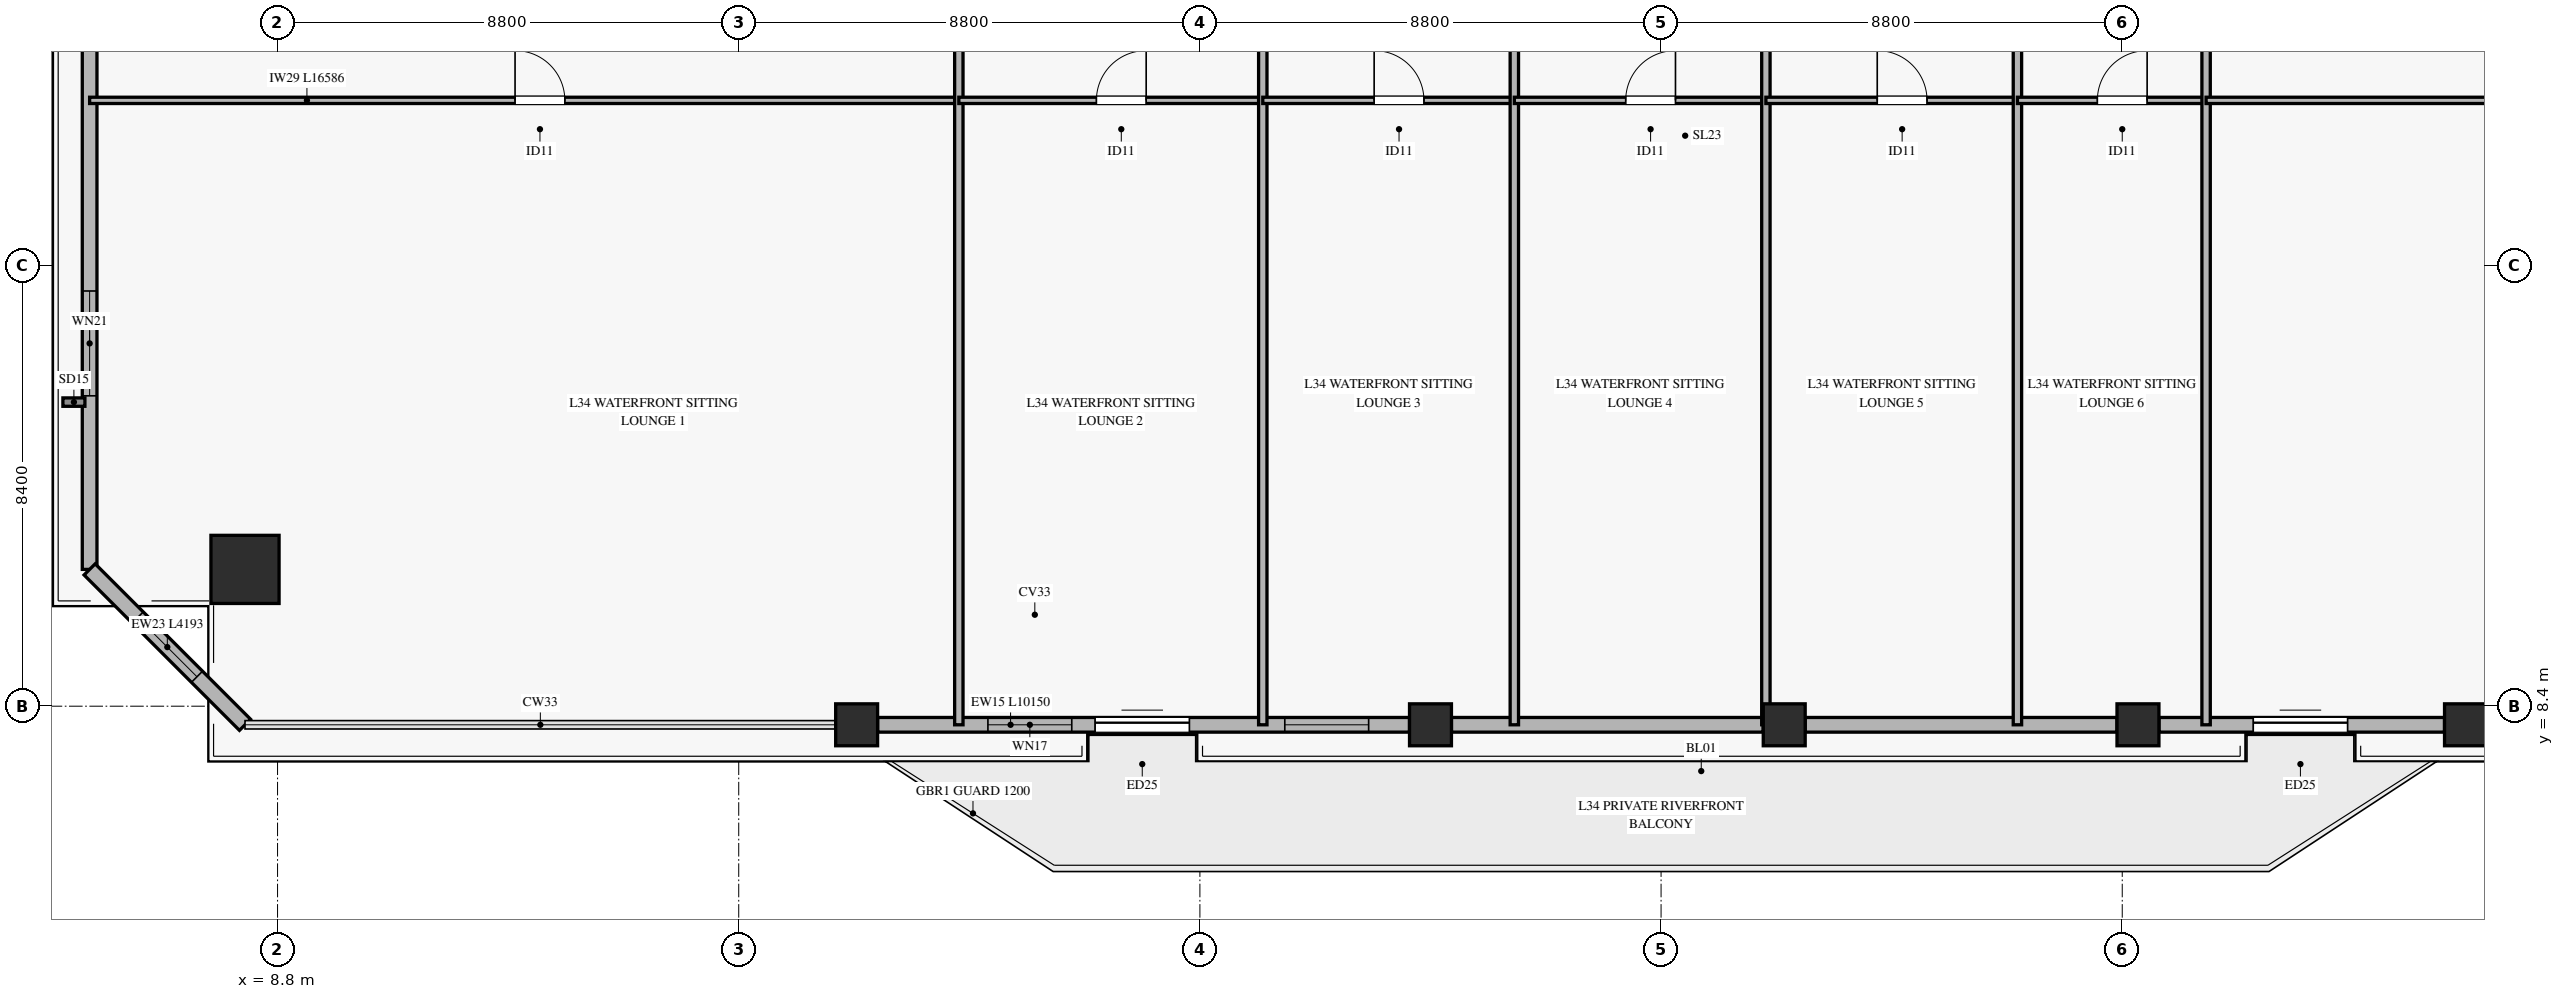
"""IFC4 building model, lengths in metres.
Left out: names, types, materials, properties, quantities, classifications, styles, units other than length and angle.
Written with IfcOpenShell. Run it as: python <this file> out.ifc"""

import sys

from ifc_helpers import new_model, si_unit, direction, frame, frame_2d, origin, origin_2d, place, context, subcontext, project, spatial, rectangle, hollow_rectangle, extrude, source, transform, mapped, element, fill, save


model = new_model("IFC4")
c1 = context("Model", 3, precision=1e-05, world=origin(), true_north=direction((0.0, 1.0)))
c2 = subcontext(c1, "Body", "Model", "MODEL_VIEW")
j1 = project(units=[si_unit("LENGTHUNIT", "METRE"), si_unit("PLANEANGLEUNIT", "RADIAN")], contexts=[c1])
p1 = place(None, origin())
s1 = spatial("IfcSite", under=j1, at=p1, CompositionType="ELEMENT")
p2 = place(p1, origin())
s2 = spatial("IfcBuilding", under=s1, at=p2, CompositionType="ELEMENT")
p3 = place(p2, frame((0.0, 0.0, 141.2)))
s3 = spatial("IfcBuildingStorey", under=s2, at=p3, CompositionType="ELEMENT", Elevation=141.2)
m1 = source(origin(), c2, "Body", "SweptSolid", [
    extrude(hollow_rectangle(XDim=1.3, YDim=1.3, WallThickness=0.06, at=origin_2d()), origin(), (0.0, 0.0, 1.0), 3.22),
])
p4 = place(p3, frame((8.179, 11.01, 0.0), z_axis=(0.0, 0.0, 1.0), x_axis=(1.0, 0.0, 0.0)))
e1 = element("IfcColumn", 1, at=p4, inside=s3, PredefinedType="COLUMN", context=c2, shape_type="MappedRepresentation", body=[
    mapped(m1, transform((0.0, 0.0, 0.0), x_axis=(1.0, 0.0, 0.0), y_axis=(0.0, 1.0, 0.0), z_axis=(0.0, 0.0, 1.0), scale=1.0)),
])
m2 = source(origin(), c2, "Body", "SweptSolid", [
    extrude(hollow_rectangle(XDim=0.8, YDim=0.8, WallThickness=0.036, at=origin_2d()), origin(), (0.0, 0.0, 1.0), 3.22),
])
for number, where, z_axis, x_axis in (
    (2, (19.85, 8.045, 0.0), (0.0, 0.0, 1.0), (1.0, 0.0, 0.0)),
    (3, (30.8, 8.045, 0.0), (0.0, 0.0, 1.0), (1.0, 0.0, 0.0)),
    (4, (37.55, 8.045, 0.0), (0.0, 0.0, 1.0), (1.0, 0.0, 0.0)),
    (5, (44.3, 8.045, 0.0), (0.0, 0.0, 1.0), (1.0, 0.0, 0.0)),
    (6, (50.55, 8.045, 0.0), (0.0, 0.0, 1.0), (1.0, 0.0, 0.0)),
):
    element("IfcColumn", number, at=place(p3, frame(where, z_axis=z_axis, x_axis=x_axis)), inside=s3, PredefinedType="COLUMN", context=c2, shape_type="MappedRepresentation", body=[
        mapped(m2, transform((0.0, 0.0, 0.0), x_axis=(1.0, 0.0, 0.0), y_axis=(0.0, 1.0, 0.0), z_axis=(0.0, 0.0, 1.0), scale=1.0)),
    ])
p5 = place(p3, frame((20.25, 8.045, 0.0), z_axis=(0.0, 0.0, 1.0), x_axis=(1.0, 0.0, 0.0)))
e7 = element("IfcWall", 7, at=p5, inside=s3, PredefinedType="SOLIDWALL", context=c2, shape_type="SweptSolid", body=[
    extrude(rectangle(XDim=10.15, YDim=0.28, at=frame_2d((5.075, 0.0))), origin(), (0.0, 0.0, 1.0), 2.7),
])
p6 = place(p5, frame((4.15, 0.0, 0.0)))
e8 = element("IfcOpeningElement", 8, at=p6, cuts=e7, PredefinedType="OPENING", context=c2, shape_type="SweptSolid", body=[
    extrude(rectangle(XDim=1.8, YDim=2.25, at=frame_2d((0.9, 1.125))), frame((0.0, 0.15, 0.0), z_axis=(0.0, -1.0, 0.0), x_axis=(1.0, 0.0, 0.0)), (0.0, 0.0, 1.0), 0.3),
])
p7 = place(p5, frame((2.105, 0.0, 0.35)))
e9 = element("IfcOpeningElement", 9, at=p7, cuts=e7, PredefinedType="OPENING", context=c2, shape_type="SweptSolid", body=[
    extrude(rectangle(XDim=1.6, YDim=2.0, at=frame_2d((0.8, 1.0))), frame((0.0, 0.15, 0.0), z_axis=(0.0, -1.0, 0.0), x_axis=(1.0, 0.0, 0.0)), (0.0, 0.0, 1.0), 0.3),
])
p8 = place(p5, frame((7.77, 0.0, 0.35)))
e10 = element("IfcOpeningElement", 10, at=p8, cuts=e7, PredefinedType="OPENING", context=c2, shape_type="SweptSolid", body=[
    extrude(rectangle(XDim=1.6, YDim=2.0, at=frame_2d((0.8, 1.0))), frame((0.0, 0.15, 0.0), z_axis=(0.0, -1.0, 0.0), x_axis=(1.0, 0.0, 0.0)), (0.0, 0.0, 1.0), 0.3),
])
for number, where, z_axis, x_axis in (
    (11, (31.2, 8.045, 0.0), (0.0, 0.0, 1.0), (1.0, 0.0, 0.0)),
    (12, (37.95, 8.045, 0.0), (0.0, 0.0, 1.0), (1.0, 0.0, 0.0)),
):
    element("IfcWall", number, at=place(p3, frame(where, z_axis=z_axis, x_axis=x_axis)), inside=s3, PredefinedType="SOLIDWALL", context=c2, shape_type="SweptSolid", body=[
        extrude(rectangle(XDim=5.95, YDim=0.28, at=frame_2d((2.975, 0.0))), origin(), (0.0, 0.0, 1.0), 2.7),
    ])
p9 = place(p3, frame((44.7, 8.045, 0.0), z_axis=(0.0, 0.0, 1.0), x_axis=(1.0, 0.0, 0.0)))
e13 = element("IfcWall", 13, at=p9, inside=s3, PredefinedType="SOLIDWALL", context=c2, shape_type="SweptSolid", body=[
    extrude(rectangle(XDim=5.45, YDim=0.28, at=frame_2d((2.725, 0.0))), origin(), (0.0, 0.0, 1.0), 2.7),
])
p10 = place(p9, frame((1.8, 0.0, 0.0)))
e14 = element("IfcOpeningElement", 14, at=p10, cuts=e13, PredefinedType="OPENING", context=c2, shape_type="SweptSolid", body=[
    extrude(rectangle(XDim=1.8, YDim=2.25, at=frame_2d((0.9, 1.125))), frame((0.0, 0.15, 0.0), z_axis=(0.0, -1.0, 0.0), x_axis=(1.0, 0.0, 0.0)), (0.0, 0.0, 1.0), 0.3),
])
p11 = place(p3, frame((5.214, 11.01, 0.0), z_axis=(0.0, 0.0, 1.0), x_axis=(0.0, 1.0, 0.0)))
e15 = element("IfcWall", 15, at=p11, inside=s3, PredefinedType="SOLIDWALL", context=c2, shape_type="SweptSolid", body=[
    extrude(rectangle(XDim=15.662, YDim=0.28, at=frame_2d((7.831, 0.0))), origin(), (0.0, 0.0, 1.0), 2.7),
])
p12 = place(p11, frame((3.312, 0.0, 0.45)))
e16 = element("IfcOpeningElement", 16, at=p12, cuts=e15, PredefinedType="OPENING", context=c2, shape_type="SweptSolid", body=[
    extrude(rectangle(XDim=2.0, YDim=2.0, at=frame_2d((1.0, 1.0))), frame((0.0, 0.15, 0.0), z_axis=(0.0, -1.0, 0.0), x_axis=(1.0, 0.0, 0.0)), (0.0, 0.0, 1.0), 0.3),
])
p13 = place(p11, frame((10.643, 0.0, 0.45)))
e17 = element("IfcOpeningElement", 17, at=p13, cuts=e15, PredefinedType="OPENING", context=c2, shape_type="SweptSolid", body=[
    extrude(rectangle(XDim=2.0, YDim=2.0, at=frame_2d((1.0, 1.0))), frame((0.0, 0.15, 0.0), z_axis=(0.0, -1.0, 0.0), x_axis=(1.0, 0.0, 0.0)), (0.0, 0.0, 1.0), 0.3),
])
p14 = place(p3, frame((5.214, 11.01, 0.0), z_axis=(0.0, 0.0, 1.0), x_axis=(0.707077668364, -0.70713589281, 0.0)))
e18 = element("IfcWall", 18, at=p14, inside=s3, PredefinedType="SOLIDWALL", context=c2, shape_type="SweptSolid", body=[
    extrude(rectangle(XDim=4.193, YDim=0.3, at=frame_2d((2.097, 0.0))), origin(), (0.0, 0.0, 1.0), 2.7),
])
p15 = place(p14, frame((1.297, 0.0, 0.45)))
e19 = element("IfcOpeningElement", 19, at=p15, cuts=e18, PredefinedType="OPENING", context=c2, shape_type="SweptSolid", body=[
    extrude(rectangle(XDim=1.6, YDim=2.0, at=frame_2d((0.8, 1.0))), frame((0.0, 0.16, 0.0), z_axis=(0.0, -1.0, 0.0), x_axis=(1.0, 0.0, 0.0)), (0.0, 0.0, 1.0), 0.32),
])
p16 = place(p3, frame((5.214, 19.959, 0.0), z_axis=(0.0, 0.0, 1.0), x_axis=(1.0, 0.0, 0.0)))
e20 = element("IfcWall", 20, at=p16, inside=s3, PredefinedType="PARTITIONING", context=c2, shape_type="SweptSolid", body=[
    extrude(rectangle(XDim=16.586, YDim=0.12, at=frame_2d((8.293, 0.0))), origin(), (0.0, 0.0, 1.0), 2.405),
])
p17 = place(p16, frame((8.118, 0.0, 0.0)))
e21 = element("IfcOpeningElement", 21, at=p17, cuts=e20, PredefinedType="OPENING", context=c2, shape_type="SweptSolid", body=[
    extrude(rectangle(XDim=0.95, YDim=2.1, at=frame_2d((0.475, 1.05))), frame((0.0, 0.07, 0.0), z_axis=(0.0, -1.0, 0.0), x_axis=(1.0, 0.0, 0.0)), (0.0, 0.0, 1.0), 0.14),
])
p18 = place(p3, frame((21.8, 8.045, 0.0), z_axis=(0.0, 0.0, 1.0), x_axis=(0.0, 1.0, 0.0)))
e22 = element("IfcWall", 22, at=p18, inside=s3, PredefinedType="PARTITIONING", context=c2, shape_type="SweptSolid", body=[
    extrude(rectangle(XDim=27.155, YDim=0.16, at=frame_2d((13.578, 0.0))), origin(), (0.0, 0.0, 1.0), 2.705),
])
p19 = place(p3, frame((21.8, 19.959, 0.0), z_axis=(0.0, 0.0, 1.0), x_axis=(1.0, 0.0, 0.0)))
e23 = element("IfcWall", 23, at=p19, inside=s3, PredefinedType="PARTITIONING", context=c2, shape_type="SweptSolid", body=[
    extrude(rectangle(XDim=5.8, YDim=0.12, at=frame_2d((2.9, 0.0))), origin(), (0.0, 0.0, 1.0), 3.22),
])
p20 = place(p19, frame((2.625, 0.0, 0.0)))
e24 = element("IfcOpeningElement", 24, at=p20, cuts=e23, PredefinedType="OPENING", context=c2, shape_type="SweptSolid", body=[
    extrude(rectangle(XDim=0.95, YDim=2.1, at=frame_2d((0.475, 1.05))), frame((0.0, 0.07, 0.0), z_axis=(0.0, -1.0, 0.0), x_axis=(1.0, 0.0, 0.0)), (0.0, 0.0, 1.0), 0.14),
])
p21 = place(p3, frame((27.6, 8.045, 0.0), z_axis=(0.0, 0.0, 1.0), x_axis=(0.0, 1.0, 0.0)))
e25 = element("IfcWall", 25, at=p21, inside=s3, PredefinedType="PARTITIONING", context=c2, shape_type="SweptSolid", body=[
    extrude(rectangle(XDim=27.155, YDim=0.16, at=frame_2d((13.578, 0.0))), origin(), (0.0, 0.0, 1.0), 2.705),
])
p22 = place(p3, frame((27.6, 19.959, 0.0), z_axis=(0.0, 0.0, 1.0), x_axis=(1.0, 0.0, 0.0)))
e26 = element("IfcWall", 26, at=p22, inside=s3, PredefinedType="PARTITIONING", context=c2, shape_type="SweptSolid", body=[
    extrude(rectangle(XDim=4.8, YDim=0.12, at=frame_2d((2.4, 0.0))), origin(), (0.0, 0.0, 1.0), 2.405),
])
p23 = place(p22, frame((2.125, 0.0, 0.0)))
e27 = element("IfcOpeningElement", 27, at=p23, cuts=e26, PredefinedType="OPENING", context=c2, shape_type="SweptSolid", body=[
    extrude(rectangle(XDim=0.95, YDim=2.1, at=frame_2d((0.475, 1.05))), frame((0.0, 0.07, 0.0), z_axis=(0.0, -1.0, 0.0), x_axis=(1.0, 0.0, 0.0)), (0.0, 0.0, 1.0), 0.14),
])
p24 = place(p3, frame((32.4, 8.045, 0.0), z_axis=(0.0, 0.0, 1.0), x_axis=(0.0, 1.0, 0.0)))
e28 = element("IfcWall", 28, at=p24, inside=s3, PredefinedType="PARTITIONING", context=c2, shape_type="SweptSolid", body=[
    extrude(rectangle(XDim=27.155, YDim=0.16, at=frame_2d((13.578, 0.0))), origin(), (0.0, 0.0, 1.0), 2.705),
])
p25 = place(p3, frame((32.4, 19.959, 0.0), z_axis=(0.0, 0.0, 1.0), x_axis=(1.0, 0.0, 0.0)))
e29 = element("IfcWall", 29, at=p25, inside=s3, PredefinedType="PARTITIONING", context=c2, shape_type="SweptSolid", body=[
    extrude(rectangle(XDim=4.8, YDim=0.12, at=frame_2d((2.4, 0.0))), origin(), (0.0, 0.0, 1.0), 3.22),
])
p26 = place(p25, frame((2.125, 0.0, 0.0)))
e30 = element("IfcOpeningElement", 30, at=p26, cuts=e29, PredefinedType="OPENING", context=c2, shape_type="SweptSolid", body=[
    extrude(rectangle(XDim=0.95, YDim=2.1, at=frame_2d((0.475, 1.05))), frame((0.0, 0.07, 0.0), z_axis=(0.0, -1.0, 0.0), x_axis=(1.0, 0.0, 0.0)), (0.0, 0.0, 1.0), 0.14),
])
p27 = place(p3, frame((37.2, 8.045, 0.0), z_axis=(0.0, 0.0, 1.0), x_axis=(0.0, 1.0, 0.0)))
e31 = element("IfcWall", 31, at=p27, inside=s3, PredefinedType="PARTITIONING", context=c2, shape_type="SweptSolid", body=[
    extrude(rectangle(XDim=27.155, YDim=0.16, at=frame_2d((13.578, 0.0))), origin(), (0.0, 0.0, 1.0), 2.755),
])
p28 = place(p3, frame((37.2, 19.959, 0.0), z_axis=(0.0, 0.0, 1.0), x_axis=(1.0, 0.0, 0.0)))
e32 = element("IfcWall", 32, at=p28, inside=s3, PredefinedType="PARTITIONING", context=c2, shape_type="SweptSolid", body=[
    extrude(rectangle(XDim=4.8, YDim=0.12, at=frame_2d((2.4, 0.0))), origin(), (0.0, 0.0, 1.0), 2.405),
])
p29 = place(p28, frame((2.125, 0.0, 0.0)))
e33 = element("IfcOpeningElement", 33, at=p29, cuts=e32, PredefinedType="OPENING", context=c2, shape_type="SweptSolid", body=[
    extrude(rectangle(XDim=0.95, YDim=2.1, at=frame_2d((0.475, 1.05))), frame((0.0, 0.07, 0.0), z_axis=(0.0, -1.0, 0.0), x_axis=(1.0, 0.0, 0.0)), (0.0, 0.0, 1.0), 0.14),
])
p30 = place(p3, frame((42.0, 8.045, 0.0), z_axis=(0.0, 0.0, 1.0), x_axis=(0.0, 1.0, 0.0)))
e34 = element("IfcWall", 34, at=p30, inside=s3, PredefinedType="PARTITIONING", context=c2, shape_type="SweptSolid", body=[
    extrude(rectangle(XDim=27.155, YDim=0.16, at=frame_2d((13.578, 0.0))), origin(), (0.0, 0.0, 1.0), 2.705),
])
p31 = place(p3, frame((42.0, 19.959, 0.0), z_axis=(0.0, 0.0, 1.0), x_axis=(1.0, 0.0, 0.0)))
e35 = element("IfcWall", 35, at=p31, inside=s3, PredefinedType="PARTITIONING", context=c2, shape_type="SweptSolid", body=[
    extrude(rectangle(XDim=3.6, YDim=0.12, at=frame_2d((1.8, 0.0))), origin(), (0.0, 0.0, 1.0), 2.405),
])
p32 = place(p31, frame((1.525, 0.0, 0.0)))
e36 = element("IfcOpeningElement", 36, at=p32, cuts=e35, PredefinedType="OPENING", context=c2, shape_type="SweptSolid", body=[
    extrude(rectangle(XDim=0.95, YDim=2.1, at=frame_2d((0.475, 1.05))), frame((0.0, 0.07, 0.0), z_axis=(0.0, -1.0, 0.0), x_axis=(1.0, 0.0, 0.0)), (0.0, 0.0, 1.0), 0.14),
])
p33 = place(p3, frame((45.6, 8.045, 0.0), z_axis=(0.0, 0.0, 1.0), x_axis=(0.0, 1.0, 0.0)))
e37 = element("IfcWall", 37, at=p33, inside=s3, PredefinedType="PARTITIONING", context=c2, shape_type="SweptSolid", body=[
    extrude(rectangle(XDim=27.155, YDim=0.16, at=frame_2d((13.578, 0.0))), origin(), (0.0, 0.0, 1.0), 2.705),
])
p34 = place(p3, frame((45.6, 19.959, 0.0), z_axis=(0.0, 0.0, 1.0), x_axis=(1.0, 0.0, 0.0)))
e38 = element("IfcWall", 38, at=p34, inside=s3, PredefinedType="PARTITIONING", context=c2, shape_type="SweptSolid", body=[
    extrude(rectangle(XDim=19.586, YDim=0.12, at=frame_2d((9.793, 0.0))), origin(), (0.0, 0.0, 1.0), 2.405),
])
p35 = place(p34, frame((9.418, 0.0, 0.0)))
e39 = element("IfcOpeningElement", 39, at=p35, cuts=e38, PredefinedType="OPENING", context=c2, shape_type="SweptSolid", body=[
    extrude(rectangle(XDim=0.95, YDim=2.1, at=frame_2d((0.475, 1.05))), frame((0.0, 0.07, 0.0), z_axis=(0.0, -1.0, 0.0), x_axis=(1.0, 0.0, 0.0)), (0.0, 0.0, 1.0), 0.14),
])
m3 = source(origin(), c2, "Body", "SweptSolid", [
    extrude(rectangle(XDim=1.8, YDim=2.25, at=frame_2d((0.9, 1.125))), frame((0.0, 0.025, 0.0), z_axis=(0.0, -1.0, 0.0), x_axis=(1.0, 0.0, 0.0)), (0.0, 0.0, 1.0), 0.05),
])
p36 = place(p6, origin())
e40 = element("IfcDoor", 40, at=p36, inside=s3, OperationType="SLIDING_TO_LEFT", PredefinedType="DOOR", context=c2, shape_type="MappedRepresentation", body=[
    mapped(m3, transform((0.0, 0.0, 0.0), x_axis=(1.0, 0.0, 0.0), y_axis=(0.0, 1.0, 0.0), z_axis=(0.0, 0.0, 1.0), scale=1.0)),
])
fill(e8, e40)
m4 = source(origin(), c2, "Body", "SweptSolid", [
    extrude(rectangle(XDim=1.6, YDim=2.0, at=frame_2d((0.8, 1.0))), frame((0.0, 0.03, 0.0), z_axis=(0.0, -1.0, 0.0), x_axis=(1.0, 0.0, 0.0)), (0.0, 0.0, 1.0), 0.06),
])
p37 = place(p7, origin())
e41 = element("IfcWindow", 41, at=p37, inside=s3, PartitioningType="SINGLE_PANEL", PredefinedType="WINDOW", context=c2, shape_type="MappedRepresentation", body=[
    mapped(m4, transform((0.0, 0.0, 0.0), x_axis=(1.0, 0.0, 0.0), y_axis=(0.0, 1.0, 0.0), z_axis=(0.0, 0.0, 1.0), scale=1.0)),
])
fill(e9, e41)
p38 = place(p8, origin())
e42 = element("IfcWindow", 42, at=p38, inside=s3, PartitioningType="SINGLE_PANEL", PredefinedType="WINDOW", context=c2, shape_type="MappedRepresentation", body=[
    mapped(m4, transform((0.0, 0.0, 0.0), x_axis=(1.0, 0.0, 0.0), y_axis=(0.0, 1.0, 0.0), z_axis=(0.0, 0.0, 1.0), scale=1.0)),
])
fill(e10, e42)
p39 = place(p10, origin())
e43 = element("IfcDoor", 43, at=p39, inside=s3, OperationType="SLIDING_TO_LEFT", PredefinedType="DOOR", context=c2, shape_type="MappedRepresentation", body=[
    mapped(m3, transform((0.0, 0.0, 0.0), x_axis=(1.0, 0.0, 0.0), y_axis=(0.0, 1.0, 0.0), z_axis=(0.0, 0.0, 1.0), scale=1.0)),
])
fill(e14, e43)
m5 = source(origin(), c2, "Body", "SweptSolid", [
    extrude(rectangle(XDim=2.0, YDim=2.0, at=frame_2d((1.0, 1.0))), frame((0.0, 0.03, 0.0), z_axis=(0.0, -1.0, 0.0), x_axis=(1.0, 0.0, 0.0)), (0.0, 0.0, 1.0), 0.06),
])
p40 = place(p12, origin())
e44 = element("IfcWindow", 44, at=p40, inside=s3, PartitioningType="SINGLE_PANEL", PredefinedType="WINDOW", context=c2, shape_type="MappedRepresentation", body=[
    mapped(m5, transform((0.0, 0.0, 0.0), x_axis=(1.0, 0.0, 0.0), y_axis=(0.0, 1.0, 0.0), z_axis=(0.0, 0.0, 1.0), scale=1.0)),
])
fill(e16, e44)
p41 = place(p15, origin())
e45 = element("IfcWindow", 45, at=p41, inside=s3, PartitioningType="SINGLE_PANEL", PredefinedType="WINDOW", context=c2, shape_type="MappedRepresentation", body=[
    mapped(m4, transform((0.0, 0.0, 0.0), x_axis=(1.0, 0.0, 0.0), y_axis=(0.0, 1.0, 0.0), z_axis=(0.0, 0.0, 1.0), scale=1.0)),
])
fill(e19, e45)
m6 = source(origin(), c2, "Body", "SweptSolid", [
    extrude(rectangle(XDim=0.95, YDim=2.1, at=frame_2d((0.475, 1.05))), frame((0.0, 0.025, 0.0), z_axis=(0.0, -1.0, 0.0), x_axis=(1.0, 0.0, 0.0)), (0.0, 0.0, 1.0), 0.05),
])
p42 = place(p17, origin())
e46 = element("IfcDoor", 46, at=p42, inside=s3, OperationType="SINGLE_SWING_LEFT", PredefinedType="DOOR", context=c2, shape_type="MappedRepresentation", body=[
    mapped(m6, transform((0.0, 0.0, 0.0), x_axis=(1.0, 0.0, 0.0), y_axis=(0.0, 1.0, 0.0), z_axis=(0.0, 0.0, 1.0), scale=1.0)),
])
fill(e21, e46)
p43 = place(p20, origin())
e47 = element("IfcDoor", 47, at=p43, inside=s3, OperationType="SINGLE_SWING_RIGHT", PredefinedType="DOOR", context=c2, shape_type="MappedRepresentation", body=[
    mapped(m6, transform((0.0, 0.0, 0.0), x_axis=(1.0, 0.0, 0.0), y_axis=(0.0, 1.0, 0.0), z_axis=(0.0, 0.0, 1.0), scale=1.0)),
])
fill(e24, e47)
p44 = place(p23, origin())
e48 = element("IfcDoor", 48, at=p44, inside=s3, OperationType="SINGLE_SWING_LEFT", PredefinedType="DOOR", context=c2, shape_type="MappedRepresentation", body=[
    mapped(m6, transform((0.0, 0.0, 0.0), x_axis=(1.0, 0.0, 0.0), y_axis=(0.0, 1.0, 0.0), z_axis=(0.0, 0.0, 1.0), scale=1.0)),
])
fill(e27, e48)
p45 = place(p26, origin())
e49 = element("IfcDoor", 49, at=p45, inside=s3, OperationType="SINGLE_SWING_RIGHT", PredefinedType="DOOR", context=c2, shape_type="MappedRepresentation", body=[
    mapped(m6, transform((0.0, 0.0, 0.0), x_axis=(1.0, 0.0, 0.0), y_axis=(0.0, 1.0, 0.0), z_axis=(0.0, 0.0, 1.0), scale=1.0)),
])
fill(e30, e49)
p46 = place(p29, origin())
e50 = element("IfcDoor", 50, at=p46, inside=s3, OperationType="SINGLE_SWING_LEFT", PredefinedType="DOOR", context=c2, shape_type="MappedRepresentation", body=[
    mapped(m6, transform((0.0, 0.0, 0.0), x_axis=(1.0, 0.0, 0.0), y_axis=(0.0, 1.0, 0.0), z_axis=(0.0, 0.0, 1.0), scale=1.0)),
])
fill(e33, e50)
p47 = place(p32, origin())
e51 = element("IfcDoor", 51, at=p47, inside=s3, OperationType="SINGLE_SWING_RIGHT", PredefinedType="DOOR", context=c2, shape_type="MappedRepresentation", body=[
    mapped(m6, transform((0.0, 0.0, 0.0), x_axis=(1.0, 0.0, 0.0), y_axis=(0.0, 1.0, 0.0), z_axis=(0.0, 0.0, 1.0), scale=1.0)),
])
fill(e36, e51)
save(model, sys.argv[1])
